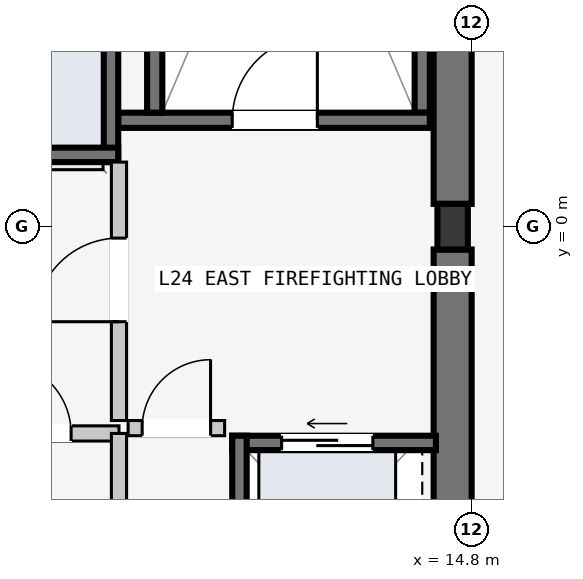
"""IFC4 building model, lengths in metres.
Left out: names, types, materials, properties, quantities, classifications, styles, units other than length and angle.
Written with IfcOpenShell. Run it as: python <this file> out.ifc"""

import sys

from ifc_helpers import new_model, si_unit, direction, frame, frame_2d, origin, origin_2d, place, context, subcontext, project, spatial, rectangle, i_section, extrude, element, fill, save


model = new_model("IFC4")
c1 = context("Model", 3, precision=1e-05, world=origin(), true_north=direction((0.0, 1.0)))
c2 = subcontext(c1, "Body", "Model", "MODEL_VIEW")
j1 = project(units=[si_unit("LENGTHUNIT", "METRE"), si_unit("PLANEANGLEUNIT", "RADIAN")], contexts=[c1])
p1 = place(None, origin())
s1 = spatial("IfcSite", under=j1, at=p1, CompositionType="ELEMENT")
p2 = place(p1, origin())
s2 = spatial("IfcBuilding", under=s1, at=p2, CompositionType="ELEMENT")
p3 = place(p2, frame((0.0, 0.0, 95.4)))
s3 = spatial("IfcBuildingStorey", under=s2, at=p3, CompositionType="ELEMENT", Elevation=95.4)
for number, where, z_axis, x_axis in (
    (1, (14.55, -9.45, -0.2), (0.0, 0.0, 1.0), (0.0, 1.0, 0.0)),
    (2, (14.55, 0.3, -0.2), (0.0, 0.0, 1.0), (0.0, 1.0, 0.0)),
):
    element("IfcWall", number, at=place(p3, frame(where, z_axis=z_axis, x_axis=x_axis)), inside=s3, PredefinedType="SHEAR", context=c2, shape_type="SweptSolid", body=[
        extrude(rectangle(XDim=9.15, YDim=0.5, at=frame_2d((4.575, 0.0))), origin(), (0.0, 0.0, 1.0), 3.6),
    ])
p4 = place(p3, frame((14.15, 1.5, -0.2), z_axis=(0.0, 0.0, 1.0), x_axis=(0.0, 1.0, 0.0)))
e3 = element("IfcWall", 3, at=p4, inside=s3, PredefinedType="SOLIDWALL", context=c2, shape_type="SweptSolid", body=[
    extrude(rectangle(XDim=7.8, YDim=0.2, at=frame_2d((3.9, 0.0))), origin(), (0.0, 0.0, 1.0), 3.6),
])
p5 = place(p3, frame((10.15, 1.4, -0.2), z_axis=(0.0, 0.0, 1.0), x_axis=(1.0, 0.0, 0.0)))
e4 = element("IfcWall", 4, at=p5, inside=s3, PredefinedType="SOLIDWALL", context=c2, shape_type="SweptSolid", body=[
    extrude(rectangle(XDim=4.1, YDim=0.2, at=frame_2d((2.05, 0.0))), origin(), (0.0, 0.0, 1.0), 3.6),
])
p6 = place(p5, frame((1.5, 0.0, 0.2)))
e5 = element("IfcOpeningElement", 5, at=p6, cuts=e4, PredefinedType="OPENING", context=c2, shape_type="SweptSolid", body=[
    extrude(rectangle(XDim=1.12, YDim=2.18, at=frame_2d((0.56, 1.09))), frame((0.0, 0.11, 0.0), z_axis=(0.0, -1.0, 0.0), x_axis=(1.0, 0.0, 0.0)), (0.0, 0.0, 1.0), 0.22),
])
p7 = place(p3, frame((10.63, 1.5, -0.2), z_axis=(0.0, 0.0, 1.0), x_axis=(0.0, 1.0, 0.0)))
e6 = element("IfcWall", 6, at=p7, inside=s3, PredefinedType="SOLIDWALL", context=c2, shape_type="SweptSolid", body=[
    extrude(rectangle(XDim=7.8, YDim=0.2, at=frame_2d((3.9, 0.0))), origin(), (0.0, 0.0, 1.0), 3.6),
])
p8 = place(p3, frame((14.55, 0.0, 0.0), z_axis=(0.0, 0.0, 1.0), x_axis=(1.0, 0.0, 0.0)))
e7 = element("IfcColumn", 7, at=p8, inside=s3, PredefinedType="COLUMN", context=c2, shape_type="SweptSolid", body=[
    extrude(i_section(OverallWidth=0.4, OverallDepth=0.6, WebThickness=0.022, FlangeThickness=0.036, at=origin_2d()), origin(), (0.0, 0.0, 1.0), 3.6),
])
p9 = place(p3, frame((10.055, 0.85, -0.2), z_axis=(0.0, 0.0, 1.0), x_axis=(0.0, 1.0, 0.0)))
e8 = element("IfcWall", 8, at=p9, inside=s3, PredefinedType="SOLIDWALL", context=c2, shape_type="SweptSolid", body=[
    extrude(rectangle(XDim=1.9, YDim=0.19, at=frame_2d((0.95, 0.0))), origin(), (0.0, 0.0, 1.0), 3.6),
])
p10 = place(p3, frame((7.95, 0.945, -0.2), z_axis=(0.0, 0.0, 1.0), x_axis=(1.0, 0.0, 0.0)))
e9 = element("IfcWall", 9, at=p10, inside=s3, PredefinedType="SOLIDWALL", context=c2, shape_type="SweptSolid", body=[
    extrude(rectangle(XDim=2.2, YDim=0.19, at=frame_2d((1.1, 0.0))), origin(), (0.0, 0.0, 1.0), 3.6),
])
p11 = place(p3, frame((11.65, -2.845, -0.2), z_axis=(0.0, 0.0, 1.0), x_axis=(1.0, 0.0, 0.0)))
e10 = element("IfcWall", 10, at=p11, inside=s3, PredefinedType="SOLIDWALL", context=c2, shape_type="SweptSolid", body=[
    extrude(rectangle(XDim=2.68, YDim=0.19, at=frame_2d((1.34, 0.0))), origin(), (0.0, 0.0, 1.0), 3.6),
])
p12 = place(p11, frame((0.65, 0.0, 0.2)))
e11 = element("IfcOpeningElement", 11, at=p12, cuts=e10, PredefinedType="OPENING", context=c2, shape_type="SweptSolid", body=[
    extrude(rectangle(XDim=1.2, YDim=2.2, at=frame_2d((0.6, 1.1))), frame((0.0, 0.105, 0.0), z_axis=(0.0, -1.0, 0.0), x_axis=(1.0, 0.0, 0.0)), (0.0, 0.0, 1.0), 0.21),
])
p13 = place(p3, frame((11.745, -5.35, -0.2), z_axis=(0.0, 0.0, 1.0), x_axis=(0.0, 1.0, 0.0)))
e12 = element("IfcWall", 12, at=p13, inside=s3, PredefinedType="SOLIDWALL", context=c2, shape_type="SweptSolid", body=[
    extrude(rectangle(XDim=2.6, YDim=0.19, at=frame_2d((1.3, 0.0))), origin(), (0.0, 0.0, 1.0), 3.6),
])
p14 = place(p3, frame((10.16, -2.55, 0.0), z_axis=(0.0, 0.0, 1.0), x_axis=(0.0, 1.0, 0.0)))
e13 = element("IfcWall", 13, at=p14, inside=s3, PredefinedType="PARTITIONING", context=c2, shape_type="SweptSolid", body=[
    extrude(rectangle(XDim=3.4, YDim=0.2, at=frame_2d((1.7, 0.0))), origin(), (0.0, 0.0, 1.0), 3.4),
])
p15 = place(p14, frame((1.3, 0.0, 0.0)))
e14 = element("IfcOpeningElement", 14, at=p15, cuts=e13, PredefinedType="OPENING", context=c2, shape_type="SweptSolid", body=[
    extrude(rectangle(XDim=1.1, YDim=2.15, at=frame_2d((0.55, 1.075))), frame((0.0, 0.11, 0.0), z_axis=(0.0, -1.0, 0.0), x_axis=(1.0, 0.0, 0.0)), (0.0, 0.0, 1.0), 0.22),
])
p16 = place(p3, frame((10.28, -2.65, 0.0), z_axis=(0.0, 0.0, 1.0), x_axis=(1.0, 0.0, 0.0)))
e15 = element("IfcWall", 15, at=p16, inside=s3, PredefinedType="PARTITIONING", context=c2, shape_type="SweptSolid", body=[
    extrude(rectangle(XDim=1.27, YDim=0.2, at=frame_2d((0.635, 0.0))), origin(), (0.0, 0.0, 1.0), 3.4),
])
p17 = place(p16, frame((0.185, 0.0, 0.0)))
e16 = element("IfcOpeningElement", 16, at=p17, cuts=e15, PredefinedType="OPENING", context=c2, shape_type="SweptSolid", body=[
    extrude(rectangle(XDim=0.9, YDim=2.15, at=frame_2d((0.45, 1.075))), frame((0.0, 0.11, 0.0), z_axis=(0.0, -1.0, 0.0), x_axis=(1.0, 0.0, 0.0)), (0.0, 0.0, 1.0), 0.22),
])
p18 = place(p3, frame((7.96, -2.72, 0.0), z_axis=(0.0, 0.0, 1.0), x_axis=(1.0, 0.0, 0.0)))
e17 = element("IfcWall", 17, at=p18, inside=s3, PredefinedType="PARTITIONING", context=c2, shape_type="SweptSolid", body=[
    extrude(rectangle(XDim=2.2, YDim=0.2, at=frame_2d((1.1, 0.0))), origin(), (0.0, 0.0, 1.0), 3.4),
])
p19 = place(p18, frame((0.62, 0.0, 0.0)))
e18 = element("IfcOpeningElement", 18, at=p19, cuts=e17, PredefinedType="OPENING", context=c2, shape_type="SweptSolid", body=[
    extrude(rectangle(XDim=0.95, YDim=2.1, at=frame_2d((0.475, 1.05))), frame((0.0, 0.11, 0.0), z_axis=(0.0, -1.0, 0.0), x_axis=(1.0, 0.0, 0.0)), (0.0, 0.0, 1.0), 0.22),
])
p20 = place(p3, frame((10.16, -5.16, 0.0), z_axis=(0.0, 0.0, 1.0), x_axis=(0.0, 1.0, 0.0)))
e19 = element("IfcWall", 19, at=p20, inside=s3, PredefinedType="PARTITIONING", context=c2, shape_type="SweptSolid", body=[
    extrude(rectangle(XDim=2.44, YDim=0.2, at=frame_2d((1.22, 0.0))), origin(), (0.0, 0.0, 1.0), 3.4),
])
p21 = place(p6, origin())
e20 = element("IfcDoor", 20, at=p21, inside=s3, OperationType="SINGLE_SWING_RIGHT", PredefinedType="DOOR", context=c2, shape_type="SweptSolid", body=[
    extrude(rectangle(XDim=1.12, YDim=2.18, at=frame_2d((0.56, 1.09))), frame((0.0, 0.025, 0.0), z_axis=(0.0, -1.0, 0.0), x_axis=(1.0, 0.0, 0.0)), (0.0, 0.0, 1.0), 0.05),
])
fill(e5, e20)
p22 = place(p12, origin())
e21 = element("IfcDoor", 21, at=p22, inside=s3, OperationType="SLIDING_TO_LEFT", PredefinedType="DOOR", context=c2, shape_type="SweptSolid", body=[
    extrude(rectangle(XDim=1.2, YDim=2.2, at=frame_2d((0.6, 1.1))), frame((0.0, 0.025, 0.0), z_axis=(0.0, -1.0, 0.0), x_axis=(1.0, 0.0, 0.0)), (0.0, 0.0, 1.0), 0.05),
])
fill(e11, e21)
p23 = place(p15, origin())
e22 = element("IfcDoor", 22, at=p23, inside=s3, OperationType="SINGLE_SWING_LEFT", PredefinedType="DOOR", context=c2, shape_type="SweptSolid", body=[
    extrude(rectangle(XDim=1.1, YDim=2.15, at=frame_2d((0.55, 1.075))), frame((0.0, 0.025, 0.0), z_axis=(0.0, -1.0, 0.0), x_axis=(1.0, 0.0, 0.0)), (0.0, 0.0, 1.0), 0.05),
])
fill(e14, e22)
p24 = place(p17, origin())
e23 = element("IfcDoor", 23, at=p24, inside=s3, OperationType="SINGLE_SWING_RIGHT", PredefinedType="DOOR", context=c2, shape_type="SweptSolid", body=[
    extrude(rectangle(XDim=0.9, YDim=2.15, at=frame_2d((0.45, 1.075))), frame((0.0, 0.025, 0.0), z_axis=(0.0, -1.0, 0.0), x_axis=(1.0, 0.0, 0.0)), (0.0, 0.0, 1.0), 0.05),
])
fill(e16, e23)
p25 = place(p19, origin())
e24 = element("IfcDoor", 24, at=p25, inside=s3, OperationType="SINGLE_SWING_LEFT", PredefinedType="DOOR", context=c2, shape_type="SweptSolid", body=[
    extrude(rectangle(XDim=0.95, YDim=2.1, at=frame_2d((0.475, 1.05))), frame((0.0, 0.025, 0.0), z_axis=(0.0, -1.0, 0.0), x_axis=(1.0, 0.0, 0.0)), (0.0, 0.0, 1.0), 0.05),
])
fill(e18, e24)
save(model, sys.argv[1])
